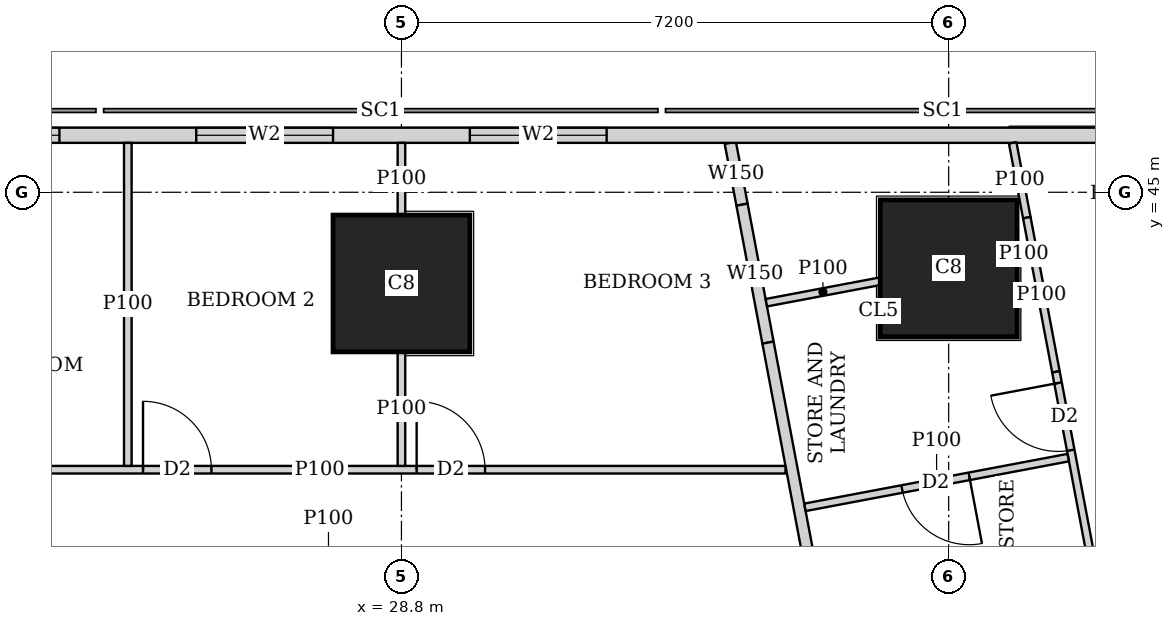
"""IFC4 building model, lengths in metres.
Left out: names, types, materials, properties, quantities, classifications, styles, units other than length and angle.
Written with IfcOpenShell. Run it as: python <this file> out.ifc"""

import sys

from ifc_helpers import new_model, si_unit, direction, frame, frame_2d, origin, origin_2d, place, context, subcontext, project, spatial, rectangle, extrude, element, fill, save


model = new_model("IFC4")
c1 = context("Model", 3, precision=1e-05, world=origin(), true_north=direction((0.0, 1.0)))
c2 = subcontext(c1, "Body", "Model", "MODEL_VIEW")
j1 = project(units=[si_unit("LENGTHUNIT", "METRE"), si_unit("PLANEANGLEUNIT", "RADIAN")], contexts=[c1])
p1 = place(None, origin())
s1 = spatial("IfcSite", under=j1, at=p1, CompositionType="ELEMENT")
p2 = place(p1, origin())
s2 = spatial("IfcBuilding", under=s1, at=p2, CompositionType="ELEMENT")
p3 = place(p2, frame((0.0, 0.0, 135.8)))
s3 = spatial("IfcBuildingStorey", under=s2, at=p3, CompositionType="ELEMENT", Elevation=135.8)
for number, where, z_axis, x_axis in (
    (1, (28.8, 43.8, 0.0), (0.0, 0.0, 1.0), (1.0, 0.0, 0.0)),
    (2, (36.0, 44.0, 0.0), (0.0, 0.0, 1.0), (1.0, 0.0, 0.0)),
):
    element("IfcColumn", number, at=place(p3, frame(where, z_axis=z_axis, x_axis=x_axis)), inside=s3, PredefinedType="COLUMN", context=c2, shape_type="SweptSolid", body=[
        extrude(rectangle(XDim=1.8, YDim=1.8, at=origin_2d()), origin(), (0.0, 0.0, 1.0), 3.75),
    ])
p4 = place(p3, frame((40.106, 45.75, 0.0), z_axis=(0.0, 0.0, 1.0), x_axis=(-1.0, 0.0, 0.0)))
e3 = element("IfcWall", 3, at=p4, inside=s3, PredefinedType="SOLIDWALL", context=c2, shape_type="SweptSolid", body=[
    extrude(rectangle(XDim=37.943, YDim=0.2, at=frame_2d((18.971, 0.0))), origin(), (0.0, 0.0, 1.0), 3.5),
])
p5 = place(p4, frame((8.606, 0.0, 0.9)))
e4 = element("IfcOpeningElement", 4, at=p5, cuts=e3, PredefinedType="OPENING", context=c2, shape_type="SweptSolid", body=[
    extrude(rectangle(XDim=1.8, YDim=1.5, at=frame_2d((0.9, 0.75))), frame((0.0, 0.11, 0.0), z_axis=(0.0, -1.0, 0.0), x_axis=(1.0, 0.0, 0.0)), (0.0, 0.0, 1.0), 0.22),
])
p6 = place(p4, frame((12.206, 0.0, 0.9)))
e5 = element("IfcOpeningElement", 5, at=p6, cuts=e3, PredefinedType="OPENING", context=c2, shape_type="SweptSolid", body=[
    extrude(rectangle(XDim=1.8, YDim=1.5, at=frame_2d((0.9, 0.75))), frame((0.0, 0.11, 0.0), z_axis=(0.0, -1.0, 0.0), x_axis=(1.0, 0.0, 0.0)), (0.0, 0.0, 1.0), 0.22),
])
p7 = place(p4, frame((15.806, 0.0, 0.9)))
e6 = element("IfcOpeningElement", 6, at=p7, cuts=e3, PredefinedType="OPENING", context=c2, shape_type="SweptSolid", body=[
    extrude(rectangle(XDim=1.8, YDim=1.5, at=frame_2d((0.9, 0.75))), frame((0.0, 0.11, 0.0), z_axis=(0.0, -1.0, 0.0), x_axis=(1.0, 0.0, 0.0)), (0.0, 0.0, 1.0), 0.22),
])
p8 = place(p4, frame((19.406, 0.0, 0.9)))
e7 = element("IfcOpeningElement", 7, at=p8, cuts=e3, PredefinedType="OPENING", context=c2, shape_type="SweptSolid", body=[
    extrude(rectangle(XDim=1.8, YDim=1.5, at=frame_2d((0.9, 0.75))), frame((0.0, 0.11, 0.0), z_axis=(0.0, -1.0, 0.0), x_axis=(1.0, 0.0, 0.0)), (0.0, 0.0, 1.0), 0.22),
])
p9 = place(p4, frame((23.006, 0.0, 0.9)))
e8 = element("IfcOpeningElement", 8, at=p9, cuts=e3, PredefinedType="OPENING", context=c2, shape_type="SweptSolid", body=[
    extrude(rectangle(XDim=1.8, YDim=1.5, at=frame_2d((0.9, 0.75))), frame((0.0, 0.11, 0.0), z_axis=(0.0, -1.0, 0.0), x_axis=(1.0, 0.0, 0.0)), (0.0, 0.0, 1.0), 0.22),
])
p10 = place(p4, frame((26.606, 0.0, 0.9)))
e9 = element("IfcOpeningElement", 9, at=p10, cuts=e3, PredefinedType="OPENING", context=c2, shape_type="SweptSolid", body=[
    extrude(rectangle(XDim=1.8, YDim=1.5, at=frame_2d((0.9, 0.75))), frame((0.0, 0.11, 0.0), z_axis=(0.0, -1.0, 0.0), x_axis=(1.0, 0.0, 0.0)), (0.0, 0.0, 1.0), 0.22),
])
p11 = place(p3, frame((33.127, 45.65, 0.0), z_axis=(0.0, 0.0, 1.0), x_axis=(0.186176514576, -0.982516313056, 0.0)))
e10 = element("IfcWall", 10, at=p11, inside=s3, PredefinedType="SOLIDWALL", context=c2, shape_type="SweptSolid", body=[
    extrude(rectangle(XDim=0.827, YDim=0.15, at=frame_2d((0.414, 0.0))), origin(), (0.0, 0.0, 1.0), 3.5),
])
p12 = place(p3, frame((33.281, 44.837, 0.0), z_axis=(0.0, 0.0, 1.0), x_axis=(0.185198323004, -0.982701165745, 0.0)))
e11 = element("IfcWall", 11, at=p12, inside=s3, PredefinedType="SOLIDWALL", context=c2, shape_type="SweptSolid", body=[
    extrude(rectangle(XDim=1.847, YDim=0.15, at=frame_2d((0.923, 0.0))), origin(), (0.0, 0.0, 1.0), 2.1),
])
p13 = place(p3, frame((33.623, 43.022, 0.0), z_axis=(0.0, 0.0, 1.0), x_axis=(0.185596841028, -0.98262597798, 0.0)))
e12 = element("IfcWall", 12, at=p13, inside=s3, PredefinedType="SOLIDWALL", context=c2, shape_type="SweptSolid", body=[
    extrude(rectangle(XDim=41.66, YDim=0.15, at=frame_2d((20.83, 0.0))), origin(), (0.0, 0.0, 1.0), 2.5),
])
p14 = place(p13, frame((20.242, 0.0, 0.0)))
e13 = element("IfcOpeningElement", 13, at=p14, cuts=e12, PredefinedType="OPENING", context=c2, shape_type="SweptSolid", body=[
    extrude(rectangle(XDim=1.0, YDim=2.1, at=frame_2d((0.5, 1.05))), frame((0.0, 0.085, 0.0), z_axis=(0.0, -1.0, 0.0), x_axis=(1.0, 0.0, 0.0)), (0.0, 0.0, 1.0), 0.17),
])
p15 = place(p13, frame((24.714, 0.0, 0.0)))
e14 = element("IfcOpeningElement", 14, at=p15, cuts=e12, PredefinedType="OPENING", context=c2, shape_type="SweptSolid", body=[
    extrude(rectangle(XDim=1.0, YDim=2.1, at=frame_2d((0.5, 1.05))), frame((0.0, 0.085, 0.0), z_axis=(0.0, -1.0, 0.0), x_axis=(1.0, 0.0, 0.0)), (0.0, 0.0, 1.0), 0.17),
])
p16 = place(p13, frame((31.206, 0.0, 0.0)))
e15 = element("IfcOpeningElement", 15, at=p16, cuts=e12, PredefinedType="OPENING", context=c2, shape_type="SweptSolid", body=[
    extrude(rectangle(XDim=1.0, YDim=2.1, at=frame_2d((0.5, 1.05))), frame((0.0, 0.085, 0.0), z_axis=(0.0, -1.0, 0.0), x_axis=(1.0, 0.0, 0.0)), (0.0, 0.0, 1.0), 0.17),
])
p17 = place(p3, frame((36.842, 45.65, 0.0), z_axis=(0.0, 0.0, 1.0), x_axis=(0.185789875365, -0.982589498322, 0.0)))
e16 = element("IfcWall", 16, at=p17, inside=s3, PredefinedType="PARTITIONING", context=c2, shape_type="SweptSolid", body=[
    extrude(rectangle(XDim=1.001, YDim=0.1, at=frame_2d((0.5, 0.0))), origin(), (0.0, 0.0, 1.0), 3.5),
])
p18 = place(p3, frame((37.028, 44.666, 0.0), z_axis=(0.0, 0.0, 1.0), x_axis=(0.185481135188, -0.982647825261, 0.0)))
e17 = element("IfcWall", 17, at=p18, inside=s3, PredefinedType="PARTITIONING", context=c2, shape_type="SweptSolid", body=[
    extrude(rectangle(XDim=2.064, YDim=0.1, at=frame_2d((1.032, 0.0))), origin(), (0.0, 0.0, 1.0), 2.1),
])
p19 = place(p3, frame((37.411, 42.638, 0.0), z_axis=(0.0, 0.0, 1.0), x_axis=(0.185555586706, -0.982633769134, 0.0)))
e18 = element("IfcWall", 18, at=p19, inside=s3, PredefinedType="PARTITIONING", context=c2, shape_type="SweptSolid", body=[
    extrude(rectangle(XDim=17.704, YDim=0.1, at=frame_2d((8.852, 0.0))), origin(), (0.0, 0.0, 1.0), 2.5),
])
p20 = place(p19, frame((16.28, 0.0, 0.0)))
e19 = element("IfcOpeningElement", 19, at=p20, cuts=e18, PredefinedType="OPENING", context=c2, shape_type="SweptSolid", body=[
    extrude(rectangle(XDim=0.9, YDim=2.1, at=frame_2d((0.45, 1.05))), frame((0.0, 0.06, 0.0), z_axis=(0.0, -1.0, 0.0), x_axis=(1.0, 0.0, 0.0)), (0.0, 0.0, 1.0), 0.12),
])
p21 = place(p19, frame((12.688, 0.0, 0.0)))
e20 = element("IfcOpeningElement", 20, at=p21, cuts=e18, PredefinedType="OPENING", context=c2, shape_type="SweptSolid", body=[
    extrude(rectangle(XDim=0.9, YDim=2.1, at=frame_2d((0.45, 1.05))), frame((0.0, 0.06, 0.0), z_axis=(0.0, -1.0, 0.0), x_axis=(1.0, 0.0, 0.0)), (0.0, 0.0, 1.0), 0.12),
])
p22 = place(p19, frame((8.822, 0.0, 0.0)))
e21 = element("IfcOpeningElement", 21, at=p22, cuts=e18, PredefinedType="OPENING", context=c2, shape_type="SweptSolid", body=[
    extrude(rectangle(XDim=0.9, YDim=2.1, at=frame_2d((0.45, 1.05))), frame((0.0, 0.06, 0.0), z_axis=(0.0, -1.0, 0.0), x_axis=(1.0, 0.0, 0.0)), (0.0, 0.0, 1.0), 0.12),
])
p23 = place(p19, frame((3.188, 0.0, 0.0)))
e22 = element("IfcOpeningElement", 22, at=p23, cuts=e18, PredefinedType="OPENING", context=c2, shape_type="SweptSolid", body=[
    extrude(rectangle(XDim=0.9, YDim=2.1, at=frame_2d((0.45, 1.05))), frame((0.0, 0.06, 0.0), z_axis=(0.0, -1.0, 0.0), x_axis=(1.0, 0.0, 0.0)), (0.0, 0.0, 1.0), 0.12),
])
p24 = place(p19, frame((0.15, 0.0, 0.0)))
e23 = element("IfcOpeningElement", 23, at=p24, cuts=e18, PredefinedType="OPENING", context=c2, shape_type="SweptSolid", body=[
    extrude(rectangle(XDim=0.9, YDim=2.1, at=frame_2d((0.45, 1.05))), frame((0.0, 0.06, 0.0), z_axis=(0.0, -1.0, 0.0), x_axis=(1.0, 0.0, 0.0)), (0.0, 0.0, 1.0), 0.12),
])
p25 = place(p19, frame((14.371, 0.0, 0.0)))
e24 = element("IfcOpeningElement", 24, at=p25, cuts=e18, PredefinedType="OPENING", context=c2, shape_type="SweptSolid", body=[
    extrude(rectangle(XDim=0.9, YDim=2.1, at=frame_2d((0.45, 1.05))), frame((0.0, 0.06, 0.0), z_axis=(0.0, -1.0, 0.0), x_axis=(1.0, 0.0, 0.0)), (0.0, 0.0, 1.0), 0.12),
])
p26 = place(p19, frame((10.78, 0.0, 0.0)))
e25 = element("IfcOpeningElement", 25, at=p26, cuts=e18, PredefinedType="OPENING", context=c2, shape_type="SweptSolid", body=[
    extrude(rectangle(XDim=0.9, YDim=2.1, at=frame_2d((0.45, 1.05))), frame((0.0, 0.06, 0.0), z_axis=(0.0, -1.0, 0.0), x_axis=(1.0, 0.0, 0.0)), (0.0, 0.0, 1.0), 0.12),
])
p27 = place(p19, frame((6.154, 0.0, 0.0)))
e26 = element("IfcOpeningElement", 26, at=p27, cuts=e18, PredefinedType="OPENING", context=c2, shape_type="SweptSolid", body=[
    extrude(rectangle(XDim=0.9, YDim=2.1, at=frame_2d((0.45, 1.05))), frame((0.0, 0.06, 0.0), z_axis=(0.0, -1.0, 0.0), x_axis=(1.0, 0.0, 0.0)), (0.0, 0.0, 1.0), 0.12),
])
p28 = place(p3, frame((37.065, 44.201, 0.0), z_axis=(0.0, 0.0, 1.0), x_axis=(-0.983168876381, -0.182699098288, 0.0)))
e27 = element("IfcWall", 27, at=p28, inside=s3, PredefinedType="PARTITIONING", context=c2, shape_type="SweptSolid", body=[
    extrude(rectangle(XDim=0.158, YDim=0.1, at=frame_2d((0.079, 0.0))), origin(), (0.0, 0.0, 1.0), 2.1),
])
p29 = place(p3, frame((35.09, 43.828, 0.0), z_axis=(0.0, 0.0, 1.0), x_axis=(-0.982683801717, -0.185290436461, 0.0)))
e28 = element("IfcWall", 28, at=p29, inside=s3, PredefinedType="PARTITIONING", context=c2, shape_type="SweptSolid", body=[
    extrude(rectangle(XDim=1.515, YDim=0.1, at=frame_2d((0.758, 0.0))), origin(), (0.0, 0.0, 1.0), 2.1),
])
p30 = place(p3, frame((21.6, 41.35, 0.0), z_axis=(0.0, 0.0, 1.0), x_axis=(1.0, 0.0, 0.0)))
e29 = element("IfcWall", 29, at=p30, inside=s3, PredefinedType="PARTITIONING", context=c2, shape_type="SweptSolid", body=[
    extrude(rectangle(XDim=12.253, YDim=0.1, at=frame_2d((6.126, 0.0))), origin(), (0.0, 0.0, 1.0), 3.5),
])
p31 = place(p30, frame((0.2, 0.0, 0.0)))
e30 = element("IfcOpeningElement", 30, at=p31, cuts=e29, PredefinedType="OPENING", context=c2, shape_type="SweptSolid", body=[
    extrude(rectangle(XDim=0.9, YDim=2.1, at=frame_2d((0.45, 1.05))), frame((0.0, 0.06, 0.0), z_axis=(0.0, -1.0, 0.0), x_axis=(1.0, 0.0, 0.0)), (0.0, 0.0, 1.0), 0.12),
])
p32 = place(p30, frame((3.8, 0.0, 0.0)))
e31 = element("IfcOpeningElement", 31, at=p32, cuts=e29, PredefinedType="OPENING", context=c2, shape_type="SweptSolid", body=[
    extrude(rectangle(XDim=0.9, YDim=2.1, at=frame_2d((0.45, 1.05))), frame((0.0, 0.06, 0.0), z_axis=(0.0, -1.0, 0.0), x_axis=(1.0, 0.0, 0.0)), (0.0, 0.0, 1.0), 0.12),
])
p33 = place(p30, frame((7.4, 0.0, 0.0)))
e32 = element("IfcOpeningElement", 32, at=p33, cuts=e29, PredefinedType="OPENING", context=c2, shape_type="SweptSolid", body=[
    extrude(rectangle(XDim=0.9, YDim=2.1, at=frame_2d((0.45, 1.05))), frame((0.0, 0.06, 0.0), z_axis=(0.0, -1.0, 0.0), x_axis=(1.0, 0.0, 0.0)), (0.0, 0.0, 1.0), 0.12),
])
p34 = place(p3, frame((25.2, 41.4, 0.0), z_axis=(0.0, 0.0, 1.0), x_axis=(0.0, 1.0, 0.0)))
e33 = element("IfcWall", 33, at=p34, inside=s3, PredefinedType="PARTITIONING", context=c2, shape_type="SweptSolid", body=[
    extrude(rectangle(XDim=4.25, YDim=0.1, at=frame_2d((2.125, 0.0))), origin(), (0.0, 0.0, 1.0), 2.1),
])
p35 = place(p3, frame((28.8, 41.4, 0.0), z_axis=(0.0, 0.0, 1.0), x_axis=(0.0, 1.0, 0.0)))
e34 = element("IfcWall", 34, at=p35, inside=s3, PredefinedType="PARTITIONING", context=c2, shape_type="SweptSolid", body=[
    extrude(rectangle(XDim=1.499, YDim=0.1, at=frame_2d((0.75, 0.0))), origin(), (0.0, 0.0, 1.0), 3.5),
])
p36 = place(p3, frame((28.8, 44.701, 0.0), z_axis=(0.0, 0.0, 1.0), x_axis=(0.0, 1.0, 0.0)))
e35 = element("IfcWall", 35, at=p36, inside=s3, PredefinedType="PARTITIONING", context=c2, shape_type="SweptSolid", body=[
    extrude(rectangle(XDim=0.949, YDim=0.1, at=frame_2d((0.475, 0.0))), origin(), (0.0, 0.0, 1.0), 3.5),
])
p37 = place(p3, frame((37.573, 41.509, 0.0), z_axis=(0.0, 0.0, 1.0), x_axis=(-0.982638553676, -0.185530247748, 0.0)))
e36 = element("IfcWall", 36, at=p37, inside=s3, PredefinedType="PARTITIONING", context=c2, shape_type="SweptSolid", body=[
    extrude(rectangle(XDim=3.525, YDim=0.1, at=frame_2d((1.763, 0.0))), origin(), (0.0, 0.0, 1.0), 3.5),
])
p38 = place(p37, frame((1.325, 0.0, 0.0)))
e37 = element("IfcOpeningElement", 37, at=p38, cuts=e36, PredefinedType="OPENING", context=c2, shape_type="SweptSolid", body=[
    extrude(rectangle(XDim=0.9, YDim=2.1, at=frame_2d((0.45, 1.05))), frame((0.0, 0.06, 0.0), z_axis=(0.0, -1.0, 0.0), x_axis=(1.0, 0.0, 0.0)), (0.0, 0.0, 1.0), 0.12),
])
p39 = place(p5, origin())
e38 = element("IfcWindow", 38, at=p39, inside=s3, PartitioningType="SINGLE_PANEL", PredefinedType="WINDOW", context=c2, shape_type="SweptSolid", body=[
    extrude(rectangle(XDim=1.8, YDim=1.5, at=frame_2d((0.9, 0.75))), frame((0.0, 0.03, 0.0), z_axis=(0.0, -1.0, 0.0), x_axis=(1.0, 0.0, 0.0)), (0.0, 0.0, 1.0), 0.06),
])
fill(e4, e38)
p40 = place(p6, origin())
e39 = element("IfcWindow", 39, at=p40, inside=s3, PartitioningType="SINGLE_PANEL", PredefinedType="WINDOW", context=c2, shape_type="SweptSolid", body=[
    extrude(rectangle(XDim=1.8, YDim=1.5, at=frame_2d((0.9, 0.75))), frame((0.0, 0.03, 0.0), z_axis=(0.0, -1.0, 0.0), x_axis=(1.0, 0.0, 0.0)), (0.0, 0.0, 1.0), 0.06),
])
fill(e5, e39)
p41 = place(p7, origin())
e40 = element("IfcWindow", 40, at=p41, inside=s3, PartitioningType="SINGLE_PANEL", PredefinedType="WINDOW", context=c2, shape_type="SweptSolid", body=[
    extrude(rectangle(XDim=1.8, YDim=1.5, at=frame_2d((0.9, 0.75))), frame((0.0, 0.03, 0.0), z_axis=(0.0, -1.0, 0.0), x_axis=(1.0, 0.0, 0.0)), (0.0, 0.0, 1.0), 0.06),
])
fill(e6, e40)
p42 = place(p24, origin())
e41 = element("IfcDoor", 41, at=p42, inside=s3, OperationType="SINGLE_SWING_RIGHT", PredefinedType="DOOR", context=c2, shape_type="SweptSolid", body=[
    extrude(rectangle(XDim=0.9, YDim=2.1, at=frame_2d((0.45, 1.05))), frame((0.0, 0.025, 0.0), z_axis=(0.0, -1.0, 0.0), x_axis=(1.0, 0.0, 0.0)), (0.0, 0.0, 1.0), 0.05),
])
fill(e23, e41)
p43 = place(p32, origin())
e42 = element("IfcDoor", 42, at=p43, inside=s3, OperationType="SINGLE_SWING_LEFT", PredefinedType="DOOR", context=c2, shape_type="SweptSolid", body=[
    extrude(rectangle(XDim=0.9, YDim=2.1, at=frame_2d((0.45, 1.05))), frame((0.0, 0.025, 0.0), z_axis=(0.0, -1.0, 0.0), x_axis=(1.0, 0.0, 0.0)), (0.0, 0.0, 1.0), 0.05),
])
fill(e31, e42)
p44 = place(p33, origin())
e43 = element("IfcDoor", 43, at=p44, inside=s3, OperationType="SINGLE_SWING_LEFT", PredefinedType="DOOR", context=c2, shape_type="SweptSolid", body=[
    extrude(rectangle(XDim=0.9, YDim=2.1, at=frame_2d((0.45, 1.05))), frame((0.0, 0.025, 0.0), z_axis=(0.0, -1.0, 0.0), x_axis=(1.0, 0.0, 0.0)), (0.0, 0.0, 1.0), 0.05),
])
fill(e32, e43)
p45 = place(p38, origin())
e44 = element("IfcDoor", 44, at=p45, inside=s3, OperationType="SINGLE_SWING_LEFT", PredefinedType="DOOR", context=c2, shape_type="SweptSolid", body=[
    extrude(rectangle(XDim=0.9, YDim=2.1, at=frame_2d((0.45, 1.05))), frame((0.0, 0.025, 0.0), z_axis=(0.0, -1.0, 0.0), x_axis=(1.0, 0.0, 0.0)), (0.0, 0.0, 1.0), 0.05),
])
fill(e37, e44)
save(model, sys.argv[1])
